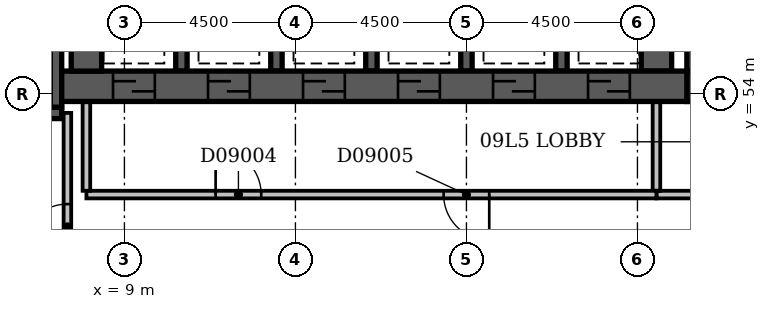
"""IFC4 building model, lengths in metres.
Left out: names, types, materials, properties, quantities, classifications, styles, units other than length and angle.
Written with IfcOpenShell. Run it as: python <this file> out.ifc"""

import sys

from ifc_helpers import new_model, si_unit, direction, frame, frame_2d, origin, place, context, subcontext, project, spatial, rectangle, extrude, element, fill, save


model = new_model("IFC4")
c1 = context("Model", 3, precision=1e-05, world=origin(), true_north=direction((0.0, 1.0)))
c2 = subcontext(c1, "Body", "Model", "MODEL_VIEW")
j1 = project(units=[si_unit("LENGTHUNIT", "METRE"), si_unit("PLANEANGLEUNIT", "RADIAN")], contexts=[c1])
p1 = place(None, origin())
s1 = spatial("IfcSite", under=j1, at=p1, CompositionType="ELEMENT")
p2 = place(p1, origin())
s2 = spatial("IfcBuilding", under=s1, at=p2, CompositionType="ELEMENT")
p3 = place(p2, frame((0.0, 0.0, 43.4)))
s3 = spatial("IfcBuildingStorey", under=s2, at=p3, CompositionType="ELEMENT", Elevation=43.4)
p4 = place(p3, frame((0.35, 53.5, -0.3), z_axis=(0.0, 0.0, 1.0), x_axis=(1.0, 0.0, 0.0)))
e1 = element("IfcWall", 1, at=p4, inside=s3, PredefinedType="SHEAR", context=c2, shape_type="SweptSolid", body=[
    extrude(rectangle(XDim=7.0, YDim=0.3, at=frame_2d((3.5, 0.0))), origin(), (0.0, 0.0, 1.0), 3.6),
])
p5 = place(p4, frame((5.58, 0.0, 0.3)))
e2 = element("IfcOpeningElement", 2, at=p5, cuts=e1, PredefinedType="OPENING", context=c2, shape_type="SweptSolid", body=[
    extrude(rectangle(XDim=1.1, YDim=2.1, at=frame_2d((0.55, 1.05))), frame((0.0, 0.162, 0.0), z_axis=(0.0, -1.0, 0.0), x_axis=(1.0, 0.0, 0.0)), (0.0, 0.0, 1.0), 0.324),
])
p6 = place(p3, frame((7.2, 53.65, -0.3), z_axis=(0.0, 0.0, 1.0), x_axis=(0.0, 1.0, 0.0)))
e3 = element("IfcWall", 3, at=p6, inside=s3, PredefinedType="SHEAR", context=c2, shape_type="SweptSolid", body=[
    extrude(rectangle(XDim=4.2, YDim=0.3, at=frame_2d((2.1, 0.0))), origin(), (0.0, 0.0, 1.0), 3.6),
])
p7 = place(p3, frame((7.35, 54.2, -0.3), z_axis=(0.0, 0.0, 1.0), x_axis=(1.0, 0.0, 0.0)))
e4 = element("IfcWall", 4, at=p7, inside=s3, PredefinedType="SHEAR", context=c2, shape_type="SweptSolid", body=[
    extrude(rectangle(XDim=16.45, YDim=0.8, at=frame_2d((8.225, 0.0))), origin(), (0.0, 0.0, 1.0), 3.6),
])
p8 = place(p7, frame((1.35, 0.0, 0.3)))
e5 = element("IfcOpeningElement", 5, at=p8, cuts=e4, PredefinedType="OPENING", context=c2, shape_type="SweptSolid", body=[
    extrude(rectangle(XDim=1.1, YDim=2.1, at=frame_2d((0.55, 1.05))), frame((0.0, 0.412, 0.0), z_axis=(0.0, -1.0, 0.0), x_axis=(1.0, 0.0, 0.0)), (0.0, 0.0, 1.0), 0.824),
])
p9 = place(p7, frame((3.85, 0.0, 0.3)))
e6 = element("IfcOpeningElement", 6, at=p9, cuts=e4, PredefinedType="OPENING", context=c2, shape_type="SweptSolid", body=[
    extrude(rectangle(XDim=1.1, YDim=2.1, at=frame_2d((0.55, 1.05))), frame((0.0, 0.412, 0.0), z_axis=(0.0, -1.0, 0.0), x_axis=(1.0, 0.0, 0.0)), (0.0, 0.0, 1.0), 0.824),
])
p10 = place(p7, frame((6.35, 0.0, 0.3)))
e7 = element("IfcOpeningElement", 7, at=p10, cuts=e4, PredefinedType="OPENING", context=c2, shape_type="SweptSolid", body=[
    extrude(rectangle(XDim=1.1, YDim=2.1, at=frame_2d((0.55, 1.05))), frame((0.0, 0.412, 0.0), z_axis=(0.0, -1.0, 0.0), x_axis=(1.0, 0.0, 0.0)), (0.0, 0.0, 1.0), 0.824),
])
p11 = place(p7, frame((8.85, 0.0, 0.3)))
e8 = element("IfcOpeningElement", 8, at=p11, cuts=e4, PredefinedType="OPENING", context=c2, shape_type="SweptSolid", body=[
    extrude(rectangle(XDim=1.1, YDim=2.1, at=frame_2d((0.55, 1.05))), frame((0.0, 0.412, 0.0), z_axis=(0.0, -1.0, 0.0), x_axis=(1.0, 0.0, 0.0)), (0.0, 0.0, 1.0), 0.824),
])
p12 = place(p7, frame((11.35, 0.0, 0.3)))
e9 = element("IfcOpeningElement", 9, at=p12, cuts=e4, PredefinedType="OPENING", context=c2, shape_type="SweptSolid", body=[
    extrude(rectangle(XDim=1.1, YDim=2.1, at=frame_2d((0.55, 1.05))), frame((0.0, 0.412, 0.0), z_axis=(0.0, -1.0, 0.0), x_axis=(1.0, 0.0, 0.0)), (0.0, 0.0, 1.0), 0.824),
])
p13 = place(p7, frame((13.85, 0.0, 0.3)))
e10 = element("IfcOpeningElement", 10, at=p13, cuts=e4, PredefinedType="OPENING", context=c2, shape_type="SweptSolid", body=[
    extrude(rectangle(XDim=1.1, YDim=2.1, at=frame_2d((0.55, 1.05))), frame((0.0, 0.412, 0.0), z_axis=(0.0, -1.0, 0.0), x_axis=(1.0, 0.0, 0.0)), (0.0, 0.0, 1.0), 0.824),
])
p14 = place(p3, frame((8.0, 54.6, -0.3), z_axis=(0.0, 0.0, 1.0), x_axis=(0.0, 1.0, 0.0)))
e11 = element("IfcWall", 11, at=p14, inside=s3, PredefinedType="SHEAR", context=c2, shape_type="SweptSolid", body=[
    extrude(rectangle(XDim=3.0, YDim=0.8, at=frame_2d((1.5, 0.0))), origin(), (0.0, 0.0, 1.0), 3.6),
])
for number, where, z_axis, x_axis in (
    (12, (10.5, 54.6, -0.3), (0.0, 0.0, 1.0), (0.0, 1.0, 0.0)),
    (13, (13.0, 54.6, -0.3), (0.0, 0.0, 1.0), (0.0, 1.0, 0.0)),
    (14, (15.5, 54.6, -0.3), (0.0, 0.0, 1.0), (0.0, 1.0, 0.0)),
    (15, (18.0, 54.6, -0.3), (0.0, 0.0, 1.0), (0.0, 1.0, 0.0)),
    (16, (20.5, 54.6, -0.3), (0.0, 0.0, 1.0), (0.0, 1.0, 0.0)),
):
    element("IfcWall", number, at=place(p3, frame(where, z_axis=z_axis, x_axis=x_axis)), inside=s3, PredefinedType="SHEAR", context=c2, shape_type="SweptSolid", body=[
        extrude(rectangle(XDim=3.0, YDim=0.3, at=frame_2d((1.5, 0.0))), origin(), (0.0, 0.0, 1.0), 3.6),
    ])
p15 = place(p3, frame((23.0, 54.6, -0.3), z_axis=(0.0, 0.0, 1.0), x_axis=(0.0, 1.0, 0.0)))
e17 = element("IfcWall", 17, at=p15, inside=s3, PredefinedType="SHEAR", context=c2, shape_type="SweptSolid", body=[
    extrude(rectangle(XDim=3.0, YDim=0.8, at=frame_2d((1.5, 0.0))), origin(), (0.0, 0.0, 1.0), 3.6),
])
p16 = place(p3, frame((23.8, 54.2, -0.3), z_axis=(0.0, 0.0, 1.0), x_axis=(1.0, 0.0, 0.0)))
e18 = element("IfcWall", 18, at=p16, inside=s3, PredefinedType="SHEAR", context=c2, shape_type="SweptSolid", body=[
    extrude(rectangle(XDim=3.3, YDim=0.8, at=frame_2d((1.65, 0.0))), origin(), (0.0, 0.0, 1.0), 3.6),
])
p17 = place(p16, frame((1.1, 0.0, 0.3)))
e19 = element("IfcOpeningElement", 19, at=p17, cuts=e18, PredefinedType="OPENING", context=c2, shape_type="SweptSolid", body=[
    extrude(rectangle(XDim=1.1, YDim=2.1, at=frame_2d((0.55, 1.05))), frame((0.0, 0.412, 0.0), z_axis=(0.0, -1.0, 0.0), x_axis=(1.0, 0.0, 0.0)), (0.0, 0.0, 1.0), 0.824),
])
p18 = place(p3, frame((24.2, 54.6, -0.3), z_axis=(0.0, 0.0, 1.0), x_axis=(0.0, 1.0, 0.0)))
e20 = element("IfcWall", 20, at=p18, inside=s3, PredefinedType="SHEAR", context=c2, shape_type="SweptSolid", body=[
    extrude(rectangle(XDim=3.0, YDim=0.8, at=frame_2d((1.5, 0.0))), origin(), (0.0, 0.0, 1.0), 3.6),
])
p19 = place(p3, frame((8.0, 51.35, 0.0), z_axis=(0.0, 0.0, 1.0), x_axis=(1.0, 0.0, 0.0)))
e21 = element("IfcWall", 21, at=p19, inside=s3, PredefinedType="PARTITIONING", context=c2, shape_type="SweptSolid", body=[
    extrude(rectangle(XDim=15.0, YDim=0.2, at=frame_2d((7.5, 0.0))), origin(), (0.0, 0.0, 1.0), 3.3),
])
p20 = place(p19, frame((3.4, 0.0, 0.0)))
e22 = element("IfcOpeningElement", 22, at=p20, cuts=e21, PredefinedType="OPENING", context=c2, shape_type="SweptSolid", body=[
    extrude(rectangle(XDim=1.2, YDim=2.1, at=frame_2d((0.6, 1.05))), frame((0.0, 0.112, 0.0), z_axis=(0.0, -1.0, 0.0), x_axis=(1.0, 0.0, 0.0)), (0.0, 0.0, 1.0), 0.224),
])
p21 = place(p19, frame((9.4, 0.0, 0.0)))
e23 = element("IfcOpeningElement", 23, at=p21, cuts=e21, PredefinedType="OPENING", context=c2, shape_type="SweptSolid", body=[
    extrude(rectangle(XDim=1.2, YDim=2.1, at=frame_2d((0.6, 1.05))), frame((0.0, 0.112, 0.0), z_axis=(0.0, -1.0, 0.0), x_axis=(1.0, 0.0, 0.0)), (0.0, 0.0, 1.0), 0.224),
])
for number, where, z_axis, x_axis in (
    (24, (23.0, 51.45, 0.0), (0.0, 0.0, 1.0), (0.0, 1.0, 0.0)),
    (25, (8.0, 51.45, 0.0), (0.0, 0.0, 1.0), (0.0, 1.0, 0.0)),
):
    element("IfcWall", number, at=place(p3, frame(where, z_axis=z_axis, x_axis=x_axis)), inside=s3, PredefinedType="PARTITIONING", context=c2, shape_type="SweptSolid", body=[
        extrude(rectangle(XDim=2.33, YDim=0.2, at=frame_2d((1.165, 0.0))), origin(), (0.0, 0.0, 1.0), 3.3),
    ])
p22 = place(p3, frame((23.0, 51.35, 0.0), z_axis=(0.0, 0.0, 1.0), x_axis=(1.0, 0.0, 0.0)))
e26 = element("IfcWall", 26, at=p22, inside=s3, PredefinedType="PARTITIONING", context=c2, shape_type="SweptSolid", body=[
    extrude(rectangle(XDim=4.8, YDim=0.2, at=frame_2d((2.4, 0.0))), origin(), (0.0, 0.0, 1.0), 3.3),
])
p23 = place(p22, frame((1.65, 0.0, 0.0)))
e27 = element("IfcOpeningElement", 27, at=p23, cuts=e26, PredefinedType="OPENING", context=c2, shape_type="SweptSolid", body=[
    extrude(rectangle(XDim=1.2, YDim=2.1, at=frame_2d((0.6, 1.05))), frame((0.0, 0.112, 0.0), z_axis=(0.0, -1.0, 0.0), x_axis=(1.0, 0.0, 0.0)), (0.0, 0.0, 1.0), 0.224),
])
p24 = place(p3, frame((7.5, 49.6, 0.0), z_axis=(0.0, 0.0, 1.0), x_axis=(0.0, 1.0, 0.0)))
e28 = element("IfcWall", 28, at=p24, inside=s3, PredefinedType="PARTITIONING", context=c2, shape_type="SweptSolid", body=[
    extrude(rectangle(XDim=3.9, YDim=0.2, at=frame_2d((1.95, 0.0))), origin(), (0.0, 0.0, 1.0), 3.3),
])
p25 = place(p24, frame((0.3, 0.0, 0.0)))
e29 = element("IfcOpeningElement", 29, at=p25, cuts=e28, PredefinedType="OPENING", context=c2, shape_type="SweptSolid", body=[
    extrude(rectangle(XDim=1.2, YDim=2.1, at=frame_2d((0.6, 1.05))), frame((0.0, 0.112, 0.0), z_axis=(0.0, -1.0, 0.0), x_axis=(1.0, 0.0, 0.0)), (0.0, 0.0, 1.0), 0.224),
])
p26 = place(p25, origin())
e30 = element("IfcDoor", 30, at=p26, inside=s3, OperationType="SINGLE_SWING_LEFT", PredefinedType="DOOR", context=c2, shape_type="SweptSolid", body=[
    extrude(rectangle(XDim=1.2, YDim=2.1, at=frame_2d((0.6, 1.05))), frame((0.0, 0.025, 0.0), z_axis=(0.0, -1.0, 0.0), x_axis=(1.0, 0.0, 0.0)), (0.0, 0.0, 1.0), 0.05),
])
fill(e29, e30)
p27 = place(p8, origin())
e31 = element("IfcDoor", 31, at=p27, inside=s3, OperationType="SLIDING_TO_LEFT", PredefinedType="DOOR", context=c2, shape_type="SweptSolid", body=[
    extrude(rectangle(XDim=1.1, YDim=2.1, at=frame_2d((0.55, 1.05))), frame((0.0, 0.025, 0.0), z_axis=(0.0, -1.0, 0.0), x_axis=(1.0, 0.0, 0.0)), (0.0, 0.0, 1.0), 0.05),
])
fill(e5, e31)
p28 = place(p9, origin())
e32 = element("IfcDoor", 32, at=p28, inside=s3, OperationType="SLIDING_TO_LEFT", PredefinedType="DOOR", context=c2, shape_type="SweptSolid", body=[
    extrude(rectangle(XDim=1.1, YDim=2.1, at=frame_2d((0.55, 1.05))), frame((0.0, 0.025, 0.0), z_axis=(0.0, -1.0, 0.0), x_axis=(1.0, 0.0, 0.0)), (0.0, 0.0, 1.0), 0.05),
])
fill(e6, e32)
p29 = place(p10, origin())
e33 = element("IfcDoor", 33, at=p29, inside=s3, OperationType="SLIDING_TO_LEFT", PredefinedType="DOOR", context=c2, shape_type="SweptSolid", body=[
    extrude(rectangle(XDim=1.1, YDim=2.1, at=frame_2d((0.55, 1.05))), frame((0.0, 0.025, 0.0), z_axis=(0.0, -1.0, 0.0), x_axis=(1.0, 0.0, 0.0)), (0.0, 0.0, 1.0), 0.05),
])
fill(e7, e33)
p30 = place(p11, origin())
e34 = element("IfcDoor", 34, at=p30, inside=s3, OperationType="SLIDING_TO_LEFT", PredefinedType="DOOR", context=c2, shape_type="SweptSolid", body=[
    extrude(rectangle(XDim=1.1, YDim=2.1, at=frame_2d((0.55, 1.05))), frame((0.0, 0.025, 0.0), z_axis=(0.0, -1.0, 0.0), x_axis=(1.0, 0.0, 0.0)), (0.0, 0.0, 1.0), 0.05),
])
fill(e8, e34)
p31 = place(p12, origin())
e35 = element("IfcDoor", 35, at=p31, inside=s3, OperationType="SLIDING_TO_LEFT", PredefinedType="DOOR", context=c2, shape_type="SweptSolid", body=[
    extrude(rectangle(XDim=1.1, YDim=2.1, at=frame_2d((0.55, 1.05))), frame((0.0, 0.025, 0.0), z_axis=(0.0, -1.0, 0.0), x_axis=(1.0, 0.0, 0.0)), (0.0, 0.0, 1.0), 0.05),
])
fill(e9, e35)
p32 = place(p13, origin())
e36 = element("IfcDoor", 36, at=p32, inside=s3, OperationType="SLIDING_TO_LEFT", PredefinedType="DOOR", context=c2, shape_type="SweptSolid", body=[
    extrude(rectangle(XDim=1.1, YDim=2.1, at=frame_2d((0.55, 1.05))), frame((0.0, 0.025, 0.0), z_axis=(0.0, -1.0, 0.0), x_axis=(1.0, 0.0, 0.0)), (0.0, 0.0, 1.0), 0.05),
])
fill(e10, e36)
p33 = place(p20, origin())
e37 = element("IfcDoor", 37, at=p33, inside=s3, OperationType="SINGLE_SWING_LEFT", PredefinedType="DOOR", context=c2, shape_type="SweptSolid", body=[
    extrude(rectangle(XDim=1.2, YDim=2.1, at=frame_2d((0.6, 1.05))), frame((0.0, 0.025, 0.0), z_axis=(0.0, -1.0, 0.0), x_axis=(1.0, 0.0, 0.0)), (0.0, 0.0, 1.0), 0.05),
])
fill(e22, e37)
p34 = place(p21, origin())
e38 = element("IfcDoor", 38, at=p34, inside=s3, OperationType="SINGLE_SWING_RIGHT", PredefinedType="DOOR", context=c2, shape_type="SweptSolid", body=[
    extrude(rectangle(XDim=1.2, YDim=2.1, at=frame_2d((0.6, 1.05))), frame((0.0, 0.025, 0.0), z_axis=(0.0, -1.0, 0.0), x_axis=(1.0, 0.0, 0.0)), (0.0, 0.0, 1.0), 0.05),
])
fill(e23, e38)
save(model, sys.argv[1])
